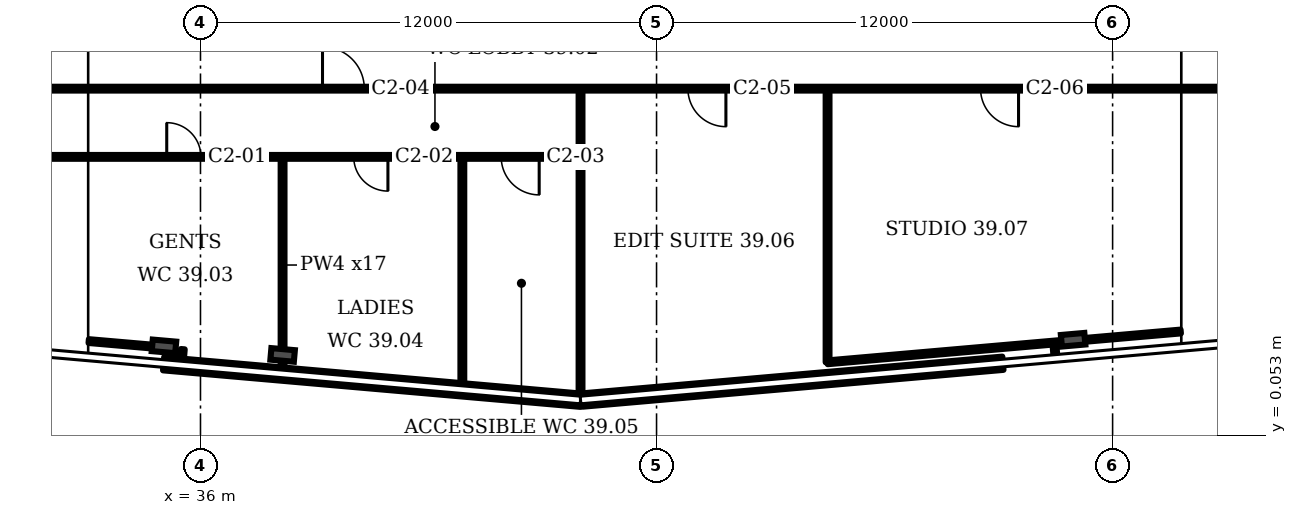
"""IFC4 building model, lengths in metres.
Left out: names, types, materials, properties, quantities, classifications, styles, units other than length and angle.
Written with IfcOpenShell. Run it as: python <this file> out.ifc"""

import sys

from ifc_helpers import new_model, si_unit, direction, frame, frame_2d, origin, origin_2d, place, context, subcontext, project, spatial, rectangle, i_section, extrude, element, fill, save


model = new_model("IFC4")
c1 = context("Model", 3, precision=1e-05, world=origin(), true_north=direction((0.0, 1.0)))
c2 = subcontext(c1, "Body", "Model", "MODEL_VIEW")
j1 = project(units=[si_unit("LENGTHUNIT", "METRE"), si_unit("PLANEANGLEUNIT", "RADIAN")], contexts=[c1])
p1 = place(None, origin())
s1 = spatial("IfcSite", under=j1, at=p1, CompositionType="ELEMENT")
p2 = place(p1, origin())
s2 = spatial("IfcBuilding", under=s1, at=p2, CompositionType="ELEMENT")
p3 = place(p2, frame((0.0, 0.0, 162.7)))
s3 = spatial("IfcBuildingStorey", under=s2, at=p3, CompositionType="ELEMENT", Elevation=162.7)
for number, where, z_axis, x_axis in (
    (1, (35.039, 2.399, 0.0), (0.0, 0.0, 1.0), (-0.087, -0.996, 0.0)),
    (2, (38.161, 2.174, 0.0), (0.0, 0.0, 1.0), (-0.087, -0.996, 0.0)),
    (3, (58.961, 2.573, 0.0), (0.0, 0.0, 1.0), (0.087, -0.996, 0.0)),
):
    element("IfcColumn", number, at=place(p3, frame(where, z_axis=z_axis, x_axis=x_axis)), inside=s3, PredefinedType="COLUMN", context=c2, shape_type="SweptSolid", body=[
        extrude(i_section(OverallWidth=0.305, OverallDepth=0.62, WebThickness=0.021, FlangeThickness=0.04, FilletRadius=0.027, at=origin_2d()), origin(), (0.0, 0.0, 1.0), 3.6),
    ])
p4 = place(p3, frame((35.03, 1.943, 0.0), z_axis=(0.0, 0.0, 1.0), x_axis=(0.996199, -0.08714, 0.0)))
e4 = element("IfcWall", 4, at=p4, inside=s3, PredefinedType="SOLIDWALL", context=c2, shape_type="SweptSolid", body=[
    extrude(rectangle(XDim=11.028, YDim=0.35, at=frame_2d((5.514, 0.0))), origin(), (0.0, 0.0, 1.0), 1.0),
])
p5 = place(p3, frame((46.045, 0.987, 0.0), z_axis=(0.0, 0.0, 1.0), x_axis=(0.996193, 0.087171, 0.0)))
e5 = element("IfcWall", 5, at=p5, inside=s3, PredefinedType="SOLIDWALL", context=c2, shape_type="SweptSolid", body=[
    extrude(rectangle(XDim=11.11, YDim=0.35, at=frame_2d((5.555, 0.0))), origin(), (0.0, 0.0, 1.0), 1.0),
])
p6 = place(p3, frame((31.714, 7.385, 0.0), z_axis=(0.0, 0.0, 1.0), x_axis=(1.0, 0.0, 0.0)))
e6 = element("IfcWall", 6, at=p6, inside=s3, PredefinedType="PARTITIONING", context=c2, shape_type="SweptSolid", body=[
    extrude(rectangle(XDim=14.286, YDim=0.1, at=frame_2d((7.143, 0.0))), origin(), (0.0, 0.0, 1.0), 3.2),
])
p7 = place(p6, frame((3.398, 0.0, 0.0)))
e7 = element("IfcOpeningElement", 7, at=p7, cuts=e6, PredefinedType="OPENING", context=c2, shape_type="SweptSolid", body=[
    extrude(rectangle(XDim=0.9, YDim=2.1, at=frame_2d((0.45, 1.05))), frame((0.0, 0.06, 0.0), z_axis=(0.0, -1.0, 0.0), x_axis=(1.0, 0.0, 0.0)), (0.0, 0.0, 1.0), 0.12),
])
p8 = place(p6, frame((8.318, 0.0, 0.0)))
e8 = element("IfcOpeningElement", 8, at=p8, cuts=e6, PredefinedType="OPENING", context=c2, shape_type="SweptSolid", body=[
    extrude(rectangle(XDim=0.9, YDim=2.1, at=frame_2d((0.45, 1.05))), frame((0.0, 0.06, 0.0), z_axis=(0.0, -1.0, 0.0), x_axis=(1.0, 0.0, 0.0)), (0.0, 0.0, 1.0), 0.12),
])
p9 = place(p6, frame((12.198, 0.0, 0.0)))
e9 = element("IfcOpeningElement", 9, at=p9, cuts=e6, PredefinedType="OPENING", context=c2, shape_type="SweptSolid", body=[
    extrude(rectangle(XDim=1.0, YDim=2.1, at=frame_2d((0.5, 1.05))), frame((0.0, 0.06, 0.0), z_axis=(0.0, -1.0, 0.0), x_axis=(1.0, 0.0, 0.0)), (0.0, 0.0, 1.0), 0.12),
])
p10 = place(p3, frame((31.714, 9.18, 0.0), z_axis=(0.0, 0.0, 1.0), x_axis=(1.0, 0.0, 0.0)))
e10 = element("IfcWall", 10, at=p10, inside=s3, PredefinedType="PARTITIONING", context=c2, shape_type="SweptSolid", body=[
    extrude(rectangle(XDim=32.072, YDim=0.1, at=frame_2d((16.036, 0.0))), origin(), (0.0, 0.0, 1.0), 3.2),
])
p11 = place(p10, frame((7.497, 0.0, 0.0)))
e11 = element("IfcOpeningElement", 11, at=p11, cuts=e10, PredefinedType="OPENING", context=c2, shape_type="SweptSolid", body=[
    extrude(rectangle(XDim=1.1, YDim=2.1, at=frame_2d((0.55, 1.05))), frame((0.0, 0.06, 0.0), z_axis=(0.0, -1.0, 0.0), x_axis=(1.0, 0.0, 0.0)), (0.0, 0.0, 1.0), 0.12),
])
p12 = place(p10, frame((17.111, 0.0, 0.0)))
e12 = element("IfcOpeningElement", 12, at=p12, cuts=e10, PredefinedType="OPENING", context=c2, shape_type="SweptSolid", body=[
    extrude(rectangle(XDim=1.0, YDim=2.1, at=frame_2d((0.5, 1.05))), frame((0.0, 0.06, 0.0), z_axis=(0.0, -1.0, 0.0), x_axis=(1.0, 0.0, 0.0)), (0.0, 0.0, 1.0), 0.12),
])
p13 = place(p10, frame((24.811, 0.0, 0.0)))
e13 = element("IfcOpeningElement", 13, at=p13, cuts=e10, PredefinedType="OPENING", context=c2, shape_type="SweptSolid", body=[
    extrude(rectangle(XDim=1.0, YDim=2.1, at=frame_2d((0.5, 1.05))), frame((0.0, 0.06, 0.0), z_axis=(0.0, -1.0, 0.0), x_axis=(1.0, 0.0, 0.0)), (0.0, 0.0, 1.0), 0.12),
])
p14 = place(p3, frame((35.0, 2.37, 0.0), z_axis=(0.0, 0.0, 1.0), x_axis=(-0.996265, 0.086343, 0.0)))
e14 = element("IfcWall", 14, at=p14, inside=s3, PredefinedType="PARTITIONING", context=c2, shape_type="SweptSolid", body=[
    extrude(rectangle(XDim=1.948, YDim=0.1, at=frame_2d((0.974, 0.0))), origin(), (0.0, 0.0, 1.0), 2.58),
])
p15 = place(p3, frame((35.502, 1.927, 0.0), z_axis=(0.0, 0.0, 1.0), x_axis=(0.083045, 0.996542, 0.0)))
e15 = element("IfcWall", 15, at=p15, inside=s3, PredefinedType="PARTITIONING", context=c2, shape_type="SweptSolid", body=[
    extrude(rectangle(XDim=0.4, YDim=0.1, at=frame_2d((0.2, 0.0))), origin(), (0.0, 0.0, 1.0), 3.2),
])
p16 = place(p3, frame((38.16, 1.694, 0.0), z_axis=(0.0, 0.0, 1.0), x_axis=(0.0, 1.0, 0.0)))
e16 = element("IfcWall", 16, at=p16, inside=s3, PredefinedType="PARTITIONING", context=c2, shape_type="SweptSolid", body=[
    extrude(rectangle(XDim=5.691, YDim=0.1, at=frame_2d((2.846, 0.0))), origin(), (0.0, 0.0, 1.0), 3.2),
])
p17 = place(p3, frame((42.89, 1.28, 0.0), z_axis=(0.0, 0.0, 1.0), x_axis=(0.0, 1.0, 0.0)))
e17 = element("IfcWall", 17, at=p17, inside=s3, PredefinedType="PARTITIONING", context=c2, shape_type="SweptSolid", body=[
    extrude(rectangle(XDim=6.105, YDim=0.1, at=frame_2d((3.052, 0.0))), origin(), (0.0, 0.0, 1.0), 3.2),
])
p18 = place(p3, frame((46.0, 1.008, 0.0), z_axis=(0.0, 0.0, 1.0), x_axis=(0.0, 1.0, 0.0)))
e18 = element("IfcWall", 18, at=p18, inside=s3, PredefinedType="PARTITIONING", context=c2, shape_type="SweptSolid", body=[
    extrude(rectangle(XDim=8.172, YDim=0.1, at=frame_2d((4.086, 0.0))), origin(), (0.0, 0.0, 1.0), 3.2),
])
p19 = place(p3, frame((52.5, 1.98, 0.0), z_axis=(0.0, 0.0, 1.0), x_axis=(0.0, 1.0, 0.0)))
e19 = element("IfcWall", 19, at=p19, inside=s3, PredefinedType="PARTITIONING", context=c2, shape_type="SweptSolid", body=[
    extrude(rectangle(XDim=7.205, YDim=0.1, at=frame_2d((3.603, 0.0))), origin(), (0.0, 0.0, 1.0), 3.2),
])
p20 = place(p3, frame((52.5, 1.98, 0.0), z_axis=(0.0, 0.0, 1.0), x_axis=(0.99622, 0.086844, 0.0)))
e20 = element("IfcWall", 20, at=p20, inside=s3, PredefinedType="PARTITIONING", context=c2, shape_type="SweptSolid", body=[
    extrude(rectangle(XDim=9.328, YDim=0.1, at=frame_2d((4.664, 0.0))), origin(), (0.0, 0.0, 1.0), 2.58),
])
p21 = place(p3, frame((58.498, 2.102, 0.0), z_axis=(0.0, 0.0, 1.0), x_axis=(-0.083045, 0.996542, 0.0)))
e21 = element("IfcWall", 21, at=p21, inside=s3, PredefinedType="PARTITIONING", context=c2, shape_type="SweptSolid", body=[
    extrude(rectangle(XDim=0.4, YDim=0.1, at=frame_2d((0.2, 0.0))), origin(), (0.0, 0.0, 1.0), 3.2),
])
p22 = place(p7, origin())
e22 = element("IfcDoor", 22, at=p22, inside=s3, OperationType="SINGLE_SWING_LEFT", PredefinedType="DOOR", context=c2, shape_type="SweptSolid", body=[
    extrude(rectangle(XDim=0.9, YDim=2.1, at=frame_2d((0.45, 1.05))), frame((0.0, 0.025, 0.0), z_axis=(0.0, -1.0, 0.0), x_axis=(1.0, 0.0, 0.0)), (0.0, 0.0, 1.0), 0.05),
])
fill(e7, e22)
p23 = place(p8, origin())
e23 = element("IfcDoor", 23, at=p23, inside=s3, OperationType="SINGLE_SWING_RIGHT", PredefinedType="DOOR", context=c2, shape_type="SweptSolid", body=[
    extrude(rectangle(XDim=0.9, YDim=2.1, at=frame_2d((0.45, 1.05))), frame((0.0, 0.025, 0.0), z_axis=(0.0, -1.0, 0.0), x_axis=(1.0, 0.0, 0.0)), (0.0, 0.0, 1.0), 0.05),
])
fill(e8, e23)
p24 = place(p9, origin())
e24 = element("IfcDoor", 24, at=p24, inside=s3, OperationType="SINGLE_SWING_RIGHT", PredefinedType="DOOR", context=c2, shape_type="SweptSolid", body=[
    extrude(rectangle(XDim=1.0, YDim=2.1, at=frame_2d((0.5, 1.05))), frame((0.0, 0.025, 0.0), z_axis=(0.0, -1.0, 0.0), x_axis=(1.0, 0.0, 0.0)), (0.0, 0.0, 1.0), 0.05),
])
fill(e9, e24)
p25 = place(p11, origin())
e25 = element("IfcDoor", 25, at=p25, inside=s3, OperationType="SINGLE_SWING_LEFT", PredefinedType="DOOR", context=c2, shape_type="SweptSolid", body=[
    extrude(rectangle(XDim=1.1, YDim=2.1, at=frame_2d((0.55, 1.05))), frame((0.0, 0.025, 0.0), z_axis=(0.0, -1.0, 0.0), x_axis=(1.0, 0.0, 0.0)), (0.0, 0.0, 1.0), 0.05),
])
fill(e11, e25)
p26 = place(p12, origin())
e26 = element("IfcDoor", 26, at=p26, inside=s3, OperationType="SINGLE_SWING_RIGHT", PredefinedType="DOOR", context=c2, shape_type="SweptSolid", body=[
    extrude(rectangle(XDim=1.0, YDim=2.1, at=frame_2d((0.5, 1.05))), frame((0.0, 0.025, 0.0), z_axis=(0.0, -1.0, 0.0), x_axis=(1.0, 0.0, 0.0)), (0.0, 0.0, 1.0), 0.05),
])
fill(e12, e26)
p27 = place(p13, origin())
e27 = element("IfcDoor", 27, at=p27, inside=s3, OperationType="SINGLE_SWING_RIGHT", PredefinedType="DOOR", context=c2, shape_type="SweptSolid", body=[
    extrude(rectangle(XDim=1.0, YDim=2.1, at=frame_2d((0.5, 1.05))), frame((0.0, 0.025, 0.0), z_axis=(0.0, -1.0, 0.0), x_axis=(1.0, 0.0, 0.0)), (0.0, 0.0, 1.0), 0.05),
])
fill(e13, e27)
save(model, sys.argv[1])
